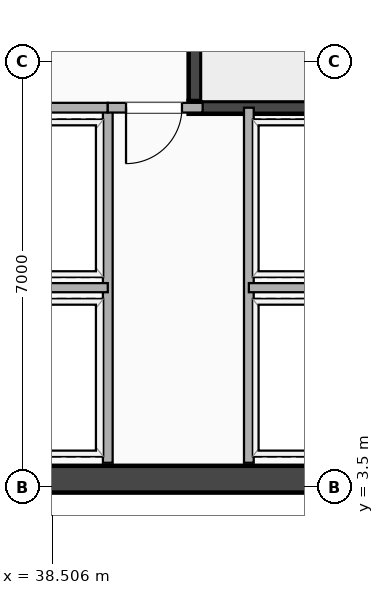
"""IFC4 building model, lengths in metres.
Left out: names, types, materials, properties, quantities, classifications, styles, units other than length and angle.
Written with IfcOpenShell. Run it as: python <this file> out.ifc"""

import sys

from ifc_helpers import new_model, si_unit, direction, frame, frame_2d, origin, place, context, subcontext, project, spatial, rectangle, extrude, element, fill, save


model = new_model("IFC4")
c1 = context("Model", 3, precision=1e-05, world=origin(), true_north=direction((0.0, 1.0)))
c2 = subcontext(c1, "Body", "Model", "MODEL_VIEW")
j1 = project(units=[si_unit("LENGTHUNIT", "METRE"), si_unit("PLANEANGLEUNIT", "RADIAN")], contexts=[c1])
p1 = place(None, origin())
s1 = spatial("IfcSite", under=j1, at=p1, CompositionType="ELEMENT")
p2 = place(p1, origin())
s2 = spatial("IfcBuilding", under=s1, at=p2, CompositionType="ELEMENT")
p3 = place(p2, frame((0.0, 0.0, 50.9)))
s3 = spatial("IfcBuildingStorey", under=s2, at=p3, CompositionType="ELEMENT", Elevation=50.9)
p4 = place(p3, frame((20.3, 3.63, 0.0), z_axis=(0.0, 0.0, 1.0), x_axis=(1.0, 0.0, 0.0)))
e1 = element("IfcWall", 1, at=p4, inside=s3, PredefinedType="SHEAR", context=c2, shape_type="SweptSolid", body=[
    extrude(rectangle(XDim=24.5, YDim=0.44, at=frame_2d((12.25, 0.0))), origin(), (0.0, 0.0, 1.0), 3.22),
])
p5 = place(p3, frame((40.855, 9.745, 0.0), z_axis=(0.0, 0.0, 1.0), x_axis=(0.0, 1.0, 0.0)))
e2 = element("IfcWall", 2, at=p5, inside=s3, PredefinedType="SHEAR", context=c2, shape_type="SweptSolid", body=[
    extrude(rectangle(XDim=8.01, YDim=0.21, at=frame_2d((4.005, 0.0))), origin(), (0.0, 0.0, 1.0), 3.22),
])
p6 = place(p3, frame((40.75, 9.745, 0.0), z_axis=(0.0, 0.0, 1.0), x_axis=(1.0, 0.0, 0.0)))
e3 = element("IfcWall", 3, at=p6, inside=s3, PredefinedType="SHEAR", context=c2, shape_type="SweptSolid", body=[
    extrude(rectangle(XDim=3.66, YDim=0.21, at=frame_2d((1.83, 0.0))), origin(), (0.0, 0.0, 1.0), 3.22),
])
for number, where, z_axis, x_axis in (
    (4, (39.42, 3.9, 0.0), (0.0, 0.0, 1.0), (0.0, 1.0, 0.0)),
    (5, (41.74, 3.9, 0.0), (0.0, 0.0, 1.0), (0.0, 1.0, 0.0)),
):
    element("IfcWall", number, at=place(p3, frame(where, z_axis=z_axis, x_axis=x_axis)), inside=s3, PredefinedType="PARTITIONING", context=c2, shape_type="SweptSolid", body=[
        extrude(rectangle(XDim=5.84, YDim=0.16, at=frame_2d((2.92, 0.0))), origin(), (0.0, 0.0, 1.0), 3.22),
    ])
p7 = place(p3, frame((37.25, 6.78, 0.0), z_axis=(0.0, 0.0, 1.0), x_axis=(1.0, 0.0, 0.0)))
e6 = element("IfcWall", 6, at=p7, inside=s3, PredefinedType="PARTITIONING", context=c2, shape_type="SweptSolid", body=[
    extrude(rectangle(XDim=2.17, YDim=0.15, at=frame_2d((1.085, 0.0))), origin(), (0.0, 0.0, 1.0), 3.22),
])
p8 = place(p3, frame((41.74, 6.78, 0.0), z_axis=(0.0, 0.0, 1.0), x_axis=(1.0, 0.0, 0.0)))
e7 = element("IfcWall", 7, at=p8, inside=s3, PredefinedType="PARTITIONING", context=c2, shape_type="SweptSolid", body=[
    extrude(rectangle(XDim=2.66, YDim=0.15, at=frame_2d((1.33, 0.0))), origin(), (0.0, 0.0, 1.0), 2.51),
])
p9 = place(p3, frame((37.25, 9.74, 0.0), z_axis=(0.0, 0.0, 1.0), x_axis=(1.0, 0.0, 0.0)))
e8 = element("IfcWall", 8, at=p9, inside=s3, PredefinedType="PARTITIONING", context=c2, shape_type="SweptSolid", body=[
    extrude(rectangle(XDim=2.17, YDim=0.16, at=frame_2d((1.085, 0.0))), origin(), (0.0, 0.0, 1.0), 3.22),
])
p10 = place(p3, frame((39.42, 9.74, 0.0), z_axis=(0.0, 0.0, 1.0), x_axis=(1.0, 0.0, 0.0)))
e9 = element("IfcWall", 9, at=p10, inside=s3, PredefinedType="PARTITIONING", context=c2, shape_type="SweptSolid", body=[
    extrude(rectangle(XDim=1.56, YDim=0.16, at=frame_2d((0.78, 0.0))), origin(), (0.0, 0.0, 1.0), 3.22),
])
p11 = place(p10, frame((0.3, 0.0, 0.0)))
e10 = element("IfcOpeningElement", 10, at=p11, cuts=e9, PredefinedType="OPENING", context=c2, shape_type="SweptSolid", body=[
    extrude(rectangle(XDim=0.92, YDim=2.08, at=frame_2d((0.46, 1.04))), frame((0.0, 0.09, 0.0), z_axis=(0.0, -1.0, 0.0), x_axis=(1.0, 0.0, 0.0)), (0.0, 0.0, 1.0), 0.18),
])
p12 = place(p11, origin())
e11 = element("IfcDoor", 11, at=p12, inside=s3, OperationType="SINGLE_SWING_LEFT", PredefinedType="DOOR", context=c2, shape_type="SweptSolid", body=[
    extrude(rectangle(XDim=0.92, YDim=2.08, at=frame_2d((0.46, 1.04))), frame((0.0, 0.025, 0.0), z_axis=(0.0, -1.0, 0.0), x_axis=(1.0, 0.0, 0.0)), (0.0, 0.0, 1.0), 0.05),
])
fill(e10, e11)
save(model, sys.argv[1])
